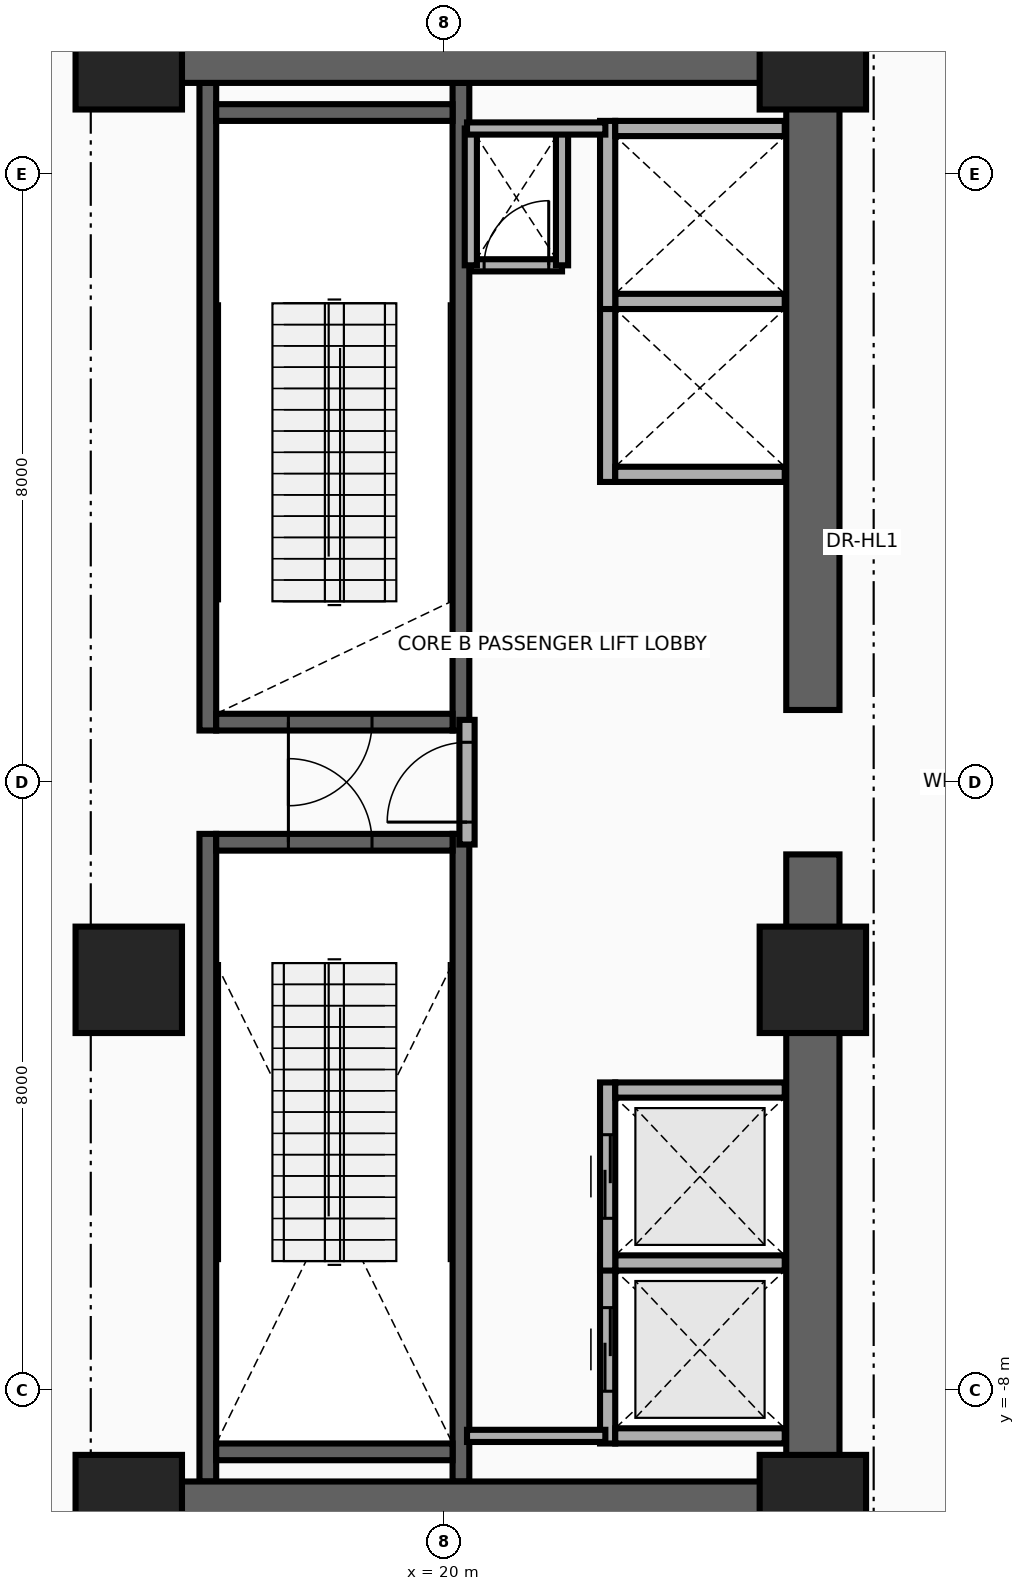
"""IFC4 building model, lengths in metres.
Left out: names, types, materials, properties, quantities, classifications, styles, units other than length and angle.
Written with IfcOpenShell. Run it as: python <this file> out.ifc"""

import sys

from ifc_helpers import new_model, si_unit, direction, frame, frame_2d, origin, origin_2d, place, context, subcontext, project, spatial, rectangle, extrude, source, transform, mapped, element, fill, save


model = new_model("IFC4")
c1 = context("Model", 3, precision=1e-05, world=origin(), true_north=direction((0.0, 1.0)))
c2 = subcontext(c1, "Body", "Model", "MODEL_VIEW")
j1 = project(units=[si_unit("LENGTHUNIT", "METRE"), si_unit("PLANEANGLEUNIT", "RADIAN")], contexts=[c1])
p1 = place(None, origin())
s1 = spatial("IfcSite", under=j1, at=p1, CompositionType="ELEMENT")
p2 = place(p1, origin())
s2 = spatial("IfcBuilding", under=s1, at=p2, CompositionType="ELEMENT")
p3 = place(p2, frame((0.0, 0.0, 5.2)))
s3 = spatial("IfcBuildingStorey", under=s2, at=p3, CompositionType="ELEMENT", Elevation=5.2)
for number, where, z_axis, x_axis in (
    (1, (16.89, 0.68, 0.0), (0.0, 0.0, 1.0), (0.0, 1.0, 0.0)),
    (2, (20.22, 0.68, 0.0), (0.0, 0.0, 1.0), (0.0, 1.0, 0.0)),
):
    element("IfcWall", number, at=place(p3, frame(where, z_axis=z_axis, x_axis=x_axis)), inside=s3, PredefinedType="SHEAR", context=c2, shape_type="SweptSolid", body=[
        extrude(rectangle(XDim=8.52, YDim=0.22, at=frame_2d((4.26, 0.0))), origin(), (0.0, 0.0, 1.0), 4.92),
    ])
p4 = place(p3, frame((17.0, 0.79, 0.0), z_axis=(0.0, 0.0, 1.0), x_axis=(1.0, 0.0, 0.0)))
e3 = element("IfcWall", 3, at=p4, inside=s3, PredefinedType="SHEAR", context=c2, shape_type="SweptSolid", body=[
    extrude(rectangle(XDim=3.11, YDim=0.22, at=frame_2d((1.555, 0.0))), origin(), (0.0, 0.0, 1.0), 4.92),
])
p5 = place(p4, frame((0.95, 0.0, 0.0)))
e4 = element("IfcOpeningElement", 4, at=p5, cuts=e3, PredefinedType="OPENING", context=c2, shape_type="SweptSolid", body=[
    extrude(rectangle(XDim=1.1, YDim=2.15, at=frame_2d((0.55, 1.075))), frame((0.0, 0.125, 0.0), z_axis=(0.0, -1.0, 0.0), x_axis=(1.0, 0.0, 0.0)), (0.0, 0.0, 1.0), 0.25),
])
p6 = place(p3, frame((17.0, 8.81, 0.0), z_axis=(0.0, 0.0, 1.0), x_axis=(1.0, 0.0, 0.0)))
e5 = element("IfcWall", 5, at=p6, inside=s3, PredefinedType="SHEAR", context=c2, shape_type="SweptSolid", body=[
    extrude(rectangle(XDim=3.11, YDim=0.22, at=frame_2d((1.555, 0.0))), origin(), (0.0, 0.0, 1.0), 4.92),
])
for number, where, z_axis, x_axis in (
    (6, (16.89, -9.2, 0.0), (0.0, 0.0, 1.0), (0.0, 1.0, 0.0)),
    (7, (20.22, -9.2, 0.0), (0.0, 0.0, 1.0), (0.0, 1.0, 0.0)),
):
    element("IfcWall", number, at=place(p3, frame(where, z_axis=z_axis, x_axis=x_axis)), inside=s3, PredefinedType="SHEAR", context=c2, shape_type="SweptSolid", body=[
        extrude(rectangle(XDim=8.52, YDim=0.22, at=frame_2d((4.26, 0.0))), origin(), (0.0, 0.0, 1.0), 4.92),
    ])
p7 = place(p3, frame((17.0, -8.81, 0.0), z_axis=(0.0, 0.0, 1.0), x_axis=(1.0, 0.0, 0.0)))
e8 = element("IfcWall", 8, at=p7, inside=s3, PredefinedType="SHEAR", context=c2, shape_type="SweptSolid", body=[
    extrude(rectangle(XDim=3.11, YDim=0.22, at=frame_2d((1.555, 0.0))), origin(), (0.0, 0.0, 1.0), 4.92),
])
p8 = place(p3, frame((17.0, -0.79, 0.0), z_axis=(0.0, 0.0, 1.0), x_axis=(1.0, 0.0, 0.0)))
e9 = element("IfcWall", 9, at=p8, inside=s3, PredefinedType="SHEAR", context=c2, shape_type="SweptSolid", body=[
    extrude(rectangle(XDim=3.11, YDim=0.22, at=frame_2d((1.555, 0.0))), origin(), (0.0, 0.0, 1.0), 4.92),
])
p9 = place(p8, frame((0.95, 0.0, 0.0)))
e10 = element("IfcOpeningElement", 10, at=p9, cuts=e9, PredefinedType="OPENING", context=c2, shape_type="SweptSolid", body=[
    extrude(rectangle(XDim=1.1, YDim=2.15, at=frame_2d((0.55, 1.075))), frame((0.0, 0.125, 0.0), z_axis=(0.0, -1.0, 0.0), x_axis=(1.0, 0.0, 0.0)), (0.0, 0.0, 1.0), 0.25),
])
for number, where, z_axis, x_axis in (
    (11, (24.85, -9.9, 0.0), (0.0, 0.0, 1.0), (0.0, 1.0, 0.0)),
    (12, (24.85, 0.95, 0.0), (0.0, 0.0, 1.0), (0.0, 1.0, 0.0)),
):
    element("IfcWall", number, at=place(p3, frame(where, z_axis=z_axis, x_axis=x_axis)), inside=s3, PredefinedType="SHEAR", context=c2, shape_type="SweptSolid", body=[
        extrude(rectangle(XDim=8.95, YDim=0.7, at=frame_2d((4.475, 0.0))), origin(), (0.0, 0.0, 1.0), 4.92),
    ])
for number, where, z_axis, x_axis in (
    (13, (15.85, 9.55, 0.0), (0.0, 0.0, 1.0), (1.0, 0.0, 0.0)),
    (14, (15.85, -9.55, 0.0), (0.0, 0.0, 1.0), (1.0, 0.0, 0.0)),
):
    element("IfcWall", number, at=place(p3, frame(where, z_axis=z_axis, x_axis=x_axis)), inside=s3, PredefinedType="SHEAR", context=c2, shape_type="SweptSolid", body=[
        extrude(rectangle(XDim=9.0, YDim=0.7, at=frame_2d((4.5, 0.0))), origin(), (0.0, 0.0, 1.0), 4.92),
    ])
m1 = source(origin(), c2, "Body", "SweptSolid", [
    extrude(rectangle(XDim=1.4, YDim=1.4, at=origin_2d()), origin(), (0.0, 0.0, 1.0), 5.2),
])
for number, where, z_axis, x_axis in (
    (15, (15.85, -9.55, 0.0), (0.0, 0.0, 1.0), (1.0, 0.0, 0.0)),
    (16, (24.85, -9.55, 0.0), (0.0, 0.0, 1.0), (1.0, 0.0, 0.0)),
    (17, (15.85, -2.6, 0.0), (0.0, 0.0, 1.0), (1.0, 0.0, 0.0)),
    (18, (24.85, -2.6, 0.0), (0.0, 0.0, 1.0), (1.0, 0.0, 0.0)),
    (19, (15.85, 9.55, 0.0), (0.0, 0.0, 1.0), (1.0, 0.0, 0.0)),
    (20, (24.85, 9.55, 0.0), (0.0, 0.0, 1.0), (1.0, 0.0, 0.0)),
):
    element("IfcColumn", number, at=place(p3, frame(where, z_axis=z_axis, x_axis=x_axis)), inside=s3, PredefinedType="COLUMN", context=c2, shape_type="MappedRepresentation", body=[
        mapped(m1, transform((0.0, 0.0, 0.0), x_axis=(1.0, 0.0, 0.0), y_axis=(0.0, 1.0, 0.0), z_axis=(0.0, 0.0, 1.0), scale=1.0)),
    ])
p10 = place(p3, frame((22.15, -8.7, 0.0), z_axis=(0.0, 0.0, 1.0), x_axis=(0.0, 1.0, 0.0)))
e21 = element("IfcWall", 21, at=p10, inside=s3, PredefinedType="MOVABLE", context=c2, shape_type="SweptSolid", body=[
    extrude(rectangle(XDim=2.475, YDim=0.2, at=frame_2d((1.237, 0.0))), origin(), (0.0, 0.0, 1.0), 4.92),
])
p11 = place(p10, frame((0.688, 0.0, 0.0)))
e22 = element("IfcOpeningElement", 22, at=p11, cuts=e21, PredefinedType="OPENING", context=c2, shape_type="SweptSolid", body=[
    extrude(rectangle(XDim=1.1, YDim=2.1, at=frame_2d((0.55, 1.05))), frame((0.0, 0.115, 0.0), z_axis=(0.0, -1.0, 0.0), x_axis=(1.0, 0.0, 0.0)), (0.0, 0.0, 1.0), 0.23),
])
for number, where, z_axis, x_axis in (
    (23, (22.25, -8.6, 0.0), (0.0, 0.0, 1.0), (1.0, 0.0, 0.0)),
    (24, (22.25, -6.325, 0.0), (0.0, 0.0, 1.0), (1.0, 0.0, 0.0)),
):
    element("IfcWall", number, at=place(p3, frame(where, z_axis=z_axis, x_axis=x_axis)), inside=s3, PredefinedType="MOVABLE", context=c2, shape_type="SweptSolid", body=[
        extrude(rectangle(XDim=2.23, YDim=0.2, at=frame_2d((1.115, 0.0))), origin(), (0.0, 0.0, 1.0), 4.92),
    ])
p12 = place(p3, frame((22.15, -6.425, 0.0), z_axis=(0.0, 0.0, 1.0), x_axis=(0.0, 1.0, 0.0)))
e25 = element("IfcWall", 25, at=p12, inside=s3, PredefinedType="MOVABLE", context=c2, shape_type="SweptSolid", body=[
    extrude(rectangle(XDim=2.475, YDim=0.2, at=frame_2d((1.238, 0.0))), origin(), (0.0, 0.0, 1.0), 4.92),
])
p13 = place(p12, frame((0.688, 0.0, 0.0)))
e26 = element("IfcOpeningElement", 26, at=p13, cuts=e25, PredefinedType="OPENING", context=c2, shape_type="SweptSolid", body=[
    extrude(rectangle(XDim=1.1, YDim=2.1, at=frame_2d((0.55, 1.05))), frame((0.0, 0.115, 0.0), z_axis=(0.0, -1.0, 0.0), x_axis=(1.0, 0.0, 0.0)), (0.0, 0.0, 1.0), 0.23),
])
p14 = place(p3, frame((22.25, -4.05, 0.0), z_axis=(0.0, 0.0, 1.0), x_axis=(1.0, 0.0, 0.0)))
e27 = element("IfcWall", 27, at=p14, inside=s3, PredefinedType="MOVABLE", context=c2, shape_type="SweptSolid", body=[
    extrude(rectangle(XDim=2.23, YDim=0.2, at=frame_2d((1.115, 0.0))), origin(), (0.0, 0.0, 1.0), 4.92),
])
p15 = place(p3, frame((22.15, 3.95, 0.0), z_axis=(0.0, 0.0, 1.0), x_axis=(0.0, 1.0, 0.0)))
e28 = element("IfcWall", 28, at=p15, inside=s3, PredefinedType="MOVABLE", context=c2, shape_type="SweptSolid", body=[
    extrude(rectangle(XDim=2.475, YDim=0.2, at=frame_2d((1.238, 0.0))), origin(), (0.0, 0.0, 1.0), 4.92),
])
for number, where, z_axis, x_axis in (
    (29, (22.25, 4.05, 0.0), (0.0, 0.0, 1.0), (1.0, 0.0, 0.0)),
    (30, (22.25, 6.325, 0.0), (0.0, 0.0, 1.0), (1.0, 0.0, 0.0)),
):
    element("IfcWall", number, at=place(p3, frame(where, z_axis=z_axis, x_axis=x_axis)), inside=s3, PredefinedType="MOVABLE", context=c2, shape_type="SweptSolid", body=[
        extrude(rectangle(XDim=2.23, YDim=0.2, at=frame_2d((1.115, 0.0))), origin(), (0.0, 0.0, 1.0), 3.745),
    ])
p16 = place(p3, frame((22.15, 6.225, 0.0), z_axis=(0.0, 0.0, 1.0), x_axis=(0.0, 1.0, 0.0)))
e31 = element("IfcWall", 31, at=p16, inside=s3, PredefinedType="MOVABLE", context=c2, shape_type="SweptSolid", body=[
    extrude(rectangle(XDim=2.475, YDim=0.2, at=frame_2d((1.237, 0.0))), origin(), (0.0, 0.0, 1.0), 4.92),
])
p17 = place(p3, frame((22.25, 8.6, 0.0), z_axis=(0.0, 0.0, 1.0), x_axis=(1.0, 0.0, 0.0)))
e32 = element("IfcWall", 32, at=p17, inside=s3, PredefinedType="MOVABLE", context=c2, shape_type="SweptSolid", body=[
    extrude(rectangle(XDim=2.23, YDim=0.2, at=frame_2d((1.115, 0.0))), origin(), (0.0, 0.0, 1.0), 3.745),
])
p18 = place(p3, frame((20.3, -0.82, 0.0), z_axis=(0.0, 0.0, 1.0), x_axis=(0.0, 1.0, 0.0)))
e33 = element("IfcWall", 33, at=p18, inside=s3, PredefinedType="PARTITIONING", context=c2, shape_type="SweptSolid", body=[
    extrude(rectangle(XDim=1.64, YDim=0.2, at=frame_2d((0.82, 0.0))), origin(), (0.0, 0.0, 1.0), 4.92),
])
p19 = place(p18, frame((0.295, 0.0, 0.0)))
e34 = element("IfcOpeningElement", 34, at=p19, cuts=e33, PredefinedType="OPENING", context=c2, shape_type="SweptSolid", body=[
    extrude(rectangle(XDim=1.05, YDim=2.15, at=frame_2d((0.525, 1.075))), frame((0.0, 0.115, 0.0), z_axis=(0.0, -1.0, 0.0), x_axis=(1.0, 0.0, 0.0)), (0.0, 0.0, 1.0), 0.23),
])
p20 = place(p3, frame((20.35, 6.8, 0.0), z_axis=(0.0, 0.0, 1.0), x_axis=(1.0, 0.0, 0.0)))
e35 = element("IfcWall", 35, at=p20, inside=s3, PredefinedType="PARTITIONING", context=c2, shape_type="SweptSolid", body=[
    extrude(rectangle(XDim=1.2, YDim=0.16, at=frame_2d((0.6, 0.0))), origin(), (0.0, 0.0, 1.0), 4.92),
])
p21 = place(p20, frame((0.175, 0.0, 0.0)))
e36 = element("IfcOpeningElement", 36, at=p21, cuts=e35, PredefinedType="OPENING", context=c2, shape_type="SweptSolid", body=[
    extrude(rectangle(XDim=0.85, YDim=2.05, at=frame_2d((0.425, 1.025))), frame((0.0, 0.095, 0.0), z_axis=(0.0, -1.0, 0.0), x_axis=(1.0, 0.0, 0.0)), (0.0, 0.0, 1.0), 0.19),
])
for number, where, z_axis, x_axis in (
    (37, (21.55, 6.8, 0.0), (0.0, 0.0, 1.0), (0.0, 1.0, 0.0)),
    (38, (20.35, 6.8, 0.0), (0.0, 0.0, 1.0), (0.0, 1.0, 0.0)),
):
    element("IfcWall", number, at=place(p3, frame(where, z_axis=z_axis, x_axis=x_axis)), inside=s3, PredefinedType="PARTITIONING", context=c2, shape_type="SweptSolid", body=[
        extrude(rectangle(XDim=1.8, YDim=0.16, at=frame_2d((0.9, 0.0))), origin(), (0.0, 0.0, 1.0), 4.92),
    ])
for number, where, z_axis, x_axis in (
    (39, (20.3, -8.6, 0.0), (0.0, 0.0, 1.0), (1.0, 0.0, 0.0)),
    (40, (20.3, 8.6, 0.0), (0.0, 0.0, 1.0), (1.0, 0.0, 0.0)),
):
    element("IfcWall", number, at=place(p3, frame(where, z_axis=z_axis, x_axis=x_axis)), inside=s3, PredefinedType="PARTITIONING", context=c2, shape_type="SweptSolid", body=[
        extrude(rectangle(XDim=1.82, YDim=0.16, at=frame_2d((0.91, 0.0))), origin(), (0.0, 0.0, 1.0), 4.92),
    ])
p22 = place(p11, origin())
e41 = element("IfcDoor", 41, at=p22, inside=s3, OperationType="DOUBLE_DOOR_SLIDING", PredefinedType="DOOR", context=c2, shape_type="SweptSolid", body=[
    extrude(rectangle(XDim=1.1, YDim=2.1, at=frame_2d((0.55, 1.05))), frame((0.0, 0.025, 0.0), z_axis=(0.0, -1.0, 0.0), x_axis=(1.0, 0.0, 0.0)), (0.0, 0.0, 1.0), 0.05),
])
fill(e22, e41)
p23 = place(p13, origin())
e42 = element("IfcDoor", 42, at=p23, inside=s3, OperationType="DOUBLE_DOOR_SLIDING", PredefinedType="DOOR", context=c2, shape_type="SweptSolid", body=[
    extrude(rectangle(XDim=1.1, YDim=2.1, at=frame_2d((0.55, 1.05))), frame((0.0, 0.025, 0.0), z_axis=(0.0, -1.0, 0.0), x_axis=(1.0, 0.0, 0.0)), (0.0, 0.0, 1.0), 0.05),
])
fill(e26, e42)
p24 = place(p19, origin())
e43 = element("IfcDoor", 43, at=p24, inside=s3, OperationType="SINGLE_SWING_RIGHT", PredefinedType="DOOR", context=c2, shape_type="SweptSolid", body=[
    extrude(rectangle(XDim=1.05, YDim=2.15, at=frame_2d((0.525, 1.075))), frame((0.0, 0.025, 0.0), z_axis=(0.0, -1.0, 0.0), x_axis=(1.0, 0.0, 0.0)), (0.0, 0.0, 1.0), 0.05),
])
fill(e34, e43)
p25 = place(p5, frame((1.1, 0.0, 0.0), z_axis=(0.0, 0.0, 1.0), x_axis=(-1.0, 0.0, 0.0)))
e44 = element("IfcDoor", 44, at=p25, inside=s3, OperationType="SINGLE_SWING_LEFT", PredefinedType="DOOR", context=c2, shape_type="SweptSolid", body=[
    extrude(rectangle(XDim=1.1, YDim=2.15, at=frame_2d((0.55, 1.075))), frame((0.0, 0.025, 0.0), z_axis=(0.0, -1.0, 0.0), x_axis=(1.0, 0.0, 0.0)), (0.0, 0.0, 1.0), 0.05),
])
fill(e4, e44)
p26 = place(p9, origin())
e45 = element("IfcDoor", 45, at=p26, inside=s3, OperationType="SINGLE_SWING_RIGHT", PredefinedType="DOOR", context=c2, shape_type="SweptSolid", body=[
    extrude(rectangle(XDim=1.1, YDim=2.15, at=frame_2d((0.55, 1.075))), frame((0.0, 0.025, 0.0), z_axis=(0.0, -1.0, 0.0), x_axis=(1.0, 0.0, 0.0)), (0.0, 0.0, 1.0), 0.05),
])
fill(e10, e45)
p27 = place(p21, origin())
e46 = element("IfcDoor", 46, at=p27, inside=s3, OperationType="SINGLE_SWING_LEFT", PredefinedType="DOOR", context=c2, shape_type="SweptSolid", body=[
    extrude(rectangle(XDim=0.85, YDim=2.05, at=frame_2d((0.425, 1.025))), frame((0.0, 0.025, 0.0), z_axis=(0.0, -1.0, 0.0), x_axis=(1.0, 0.0, 0.0)), (0.0, 0.0, 1.0), 0.05),
])
fill(e36, e46)
save(model, sys.argv[1])
